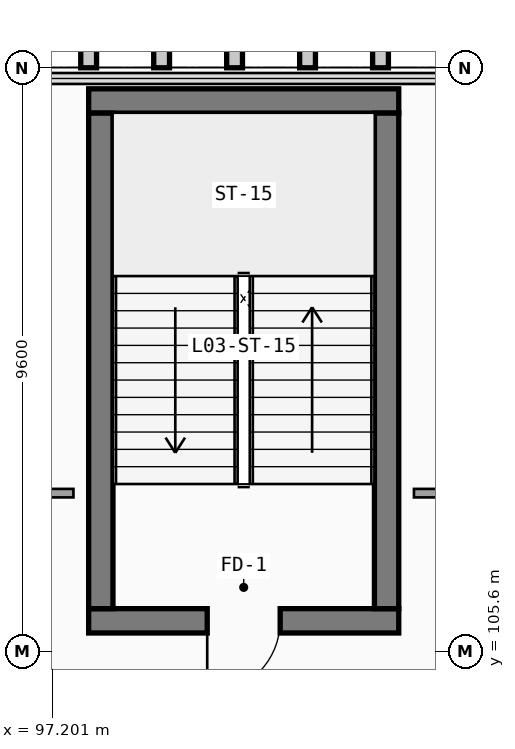
"""IFC4 building model, lengths in metres.
Left out: names, types, materials, properties, quantities, classifications, styles, units other than length and angle.
Written with IfcOpenShell. Run it as: python <this file> out.ifc"""

import sys

from ifc_helpers import new_model, si_unit, direction, frame, frame_2d, origin, place, context, subcontext, project, spatial, rectangle, extrude, element, fill, save


model = new_model("IFC4")
c1 = context("Model", 3, precision=1e-05, world=origin(), true_north=direction((0.0, 1.0)))
c2 = subcontext(c1, "Body", "Model", "MODEL_VIEW")
j1 = project(units=[si_unit("LENGTHUNIT", "METRE"), si_unit("PLANEANGLEUNIT", "RADIAN")], contexts=[c1])
p1 = place(None, origin())
s1 = spatial("IfcSite", under=j1, at=p1, CompositionType="ELEMENT")
p2 = place(p1, origin())
s2 = spatial("IfcBuilding", under=s1, at=p2, CompositionType="ELEMENT")
p3 = place(p2, frame((0.0, 0.0, 14.1)))
s3 = spatial("IfcBuildingStorey", under=s2, at=p3, CompositionType="ELEMENT", Elevation=14.1)
p4 = place(p3, frame((97.8, 106.1, 0.0), z_axis=(0.0, 0.0, 1.0), x_axis=(1.0, 0.0, 0.0)))
e1 = element("IfcWall", 1, at=p4, inside=s3, PredefinedType="SHEAR", context=c2, shape_type="SweptSolid", body=[
    extrude(rectangle(XDim=5.1, YDim=0.4, at=frame_2d((2.55, 0.0))), origin(), (0.0, 0.0, 1.0), 4.24),
])
p5 = place(p4, frame((3.15, 0.0, 0.0), z_axis=(0.0, 0.0, 1.0), x_axis=(-1.0, 0.0, 0.0)))
e2 = element("IfcOpeningElement", 2, at=p5, cuts=e1, PredefinedType="OPENING", context=c2, shape_type="SweptSolid", body=[
    extrude(rectangle(XDim=1.2, YDim=2.2, at=frame_2d((0.6, 1.1))), frame((0.0, 0.21, 0.0), z_axis=(0.0, -1.0, 0.0), x_axis=(1.0, 0.0, 0.0)), (0.0, 0.0, 1.0), 0.42),
])
p6 = place(p3, frame((102.9, 114.65, 0.0), z_axis=(0.0, 0.0, 1.0), x_axis=(-1.0, 0.0, 0.0)))
e3 = element("IfcWall", 3, at=p6, inside=s3, PredefinedType="SHEAR", context=c2, shape_type="SweptSolid", body=[
    extrude(rectangle(XDim=5.1, YDim=0.4, at=frame_2d((2.55, 0.0))), origin(), (0.0, 0.0, 1.0), 4.24),
])
for number, where, z_axis, x_axis in (
    (4, (98.0, 114.45, 0.0), (0.0, 0.0, 1.0), (0.0, -1.0, 0.0)),
    (5, (102.7, 106.3, 0.0), (0.0, 0.0, 1.0), (0.0, 1.0, 0.0)),
):
    element("IfcWall", number, at=place(p3, frame(where, z_axis=z_axis, x_axis=x_axis)), inside=s3, PredefinedType="SHEAR", context=c2, shape_type="SweptSolid", body=[
        extrude(rectangle(XDim=8.15, YDim=0.4, at=frame_2d((4.075, 0.0))), origin(), (0.0, 0.0, 1.0), 4.24),
    ])
p7 = place(p3, frame((92.38, 108.2, 0.0), z_axis=(0.0, 0.0, 1.0), x_axis=(1.0, 0.0, 0.0)))
e6 = element("IfcWall", 6, at=p7, inside=s3, PredefinedType="PARTITIONING", context=c2, shape_type="SweptSolid", body=[
    extrude(rectangle(XDim=5.17, YDim=0.14, at=frame_2d((2.585, 0.0))), origin(), (0.0, 0.0, 1.0), 3.638),
])
p8 = place(p7, frame((2.085, 0.0, 0.0), z_axis=(0.0, 0.0, 1.0), x_axis=(1.0, 0.0, 0.0)))
e7 = element("IfcOpeningElement", 7, at=p8, cuts=e6, PredefinedType="OPENING", context=c2, shape_type="SweptSolid", body=[
    extrude(rectangle(XDim=1.0, YDim=2.2, at=frame_2d((0.5, 1.1))), frame((0.0, 0.08, 0.0), z_axis=(0.0, -1.0, 0.0), x_axis=(1.0, 0.0, 0.0)), (0.0, 0.0, 1.0), 0.16),
])
p9 = place(p3, frame((103.15, 108.2, 0.0), z_axis=(0.0, 0.0, 1.0), x_axis=(1.0, 0.0, 0.0)))
e8 = element("IfcWall", 8, at=p9, inside=s3, PredefinedType="PARTITIONING", context=c2, shape_type="SweptSolid", body=[
    extrude(rectangle(XDim=3.67, YDim=0.14, at=frame_2d((1.835, 0.0))), origin(), (0.0, 0.0, 1.0), 3.638),
])
p10 = place(p5, origin())
e9 = element("IfcDoor", 9, at=p10, inside=s3, OperationType="SINGLE_SWING_RIGHT", PredefinedType="DOOR", context=c2, shape_type="SweptSolid", body=[
    extrude(rectangle(XDim=1.2, YDim=2.2, at=frame_2d((0.6, 1.1))), frame((0.0, 0.025, 0.0), z_axis=(0.0, -1.0, 0.0), x_axis=(1.0, 0.0, 0.0)), (0.0, 0.0, 1.0), 0.05),
])
fill(e2, e9)
save(model, sys.argv[1])
